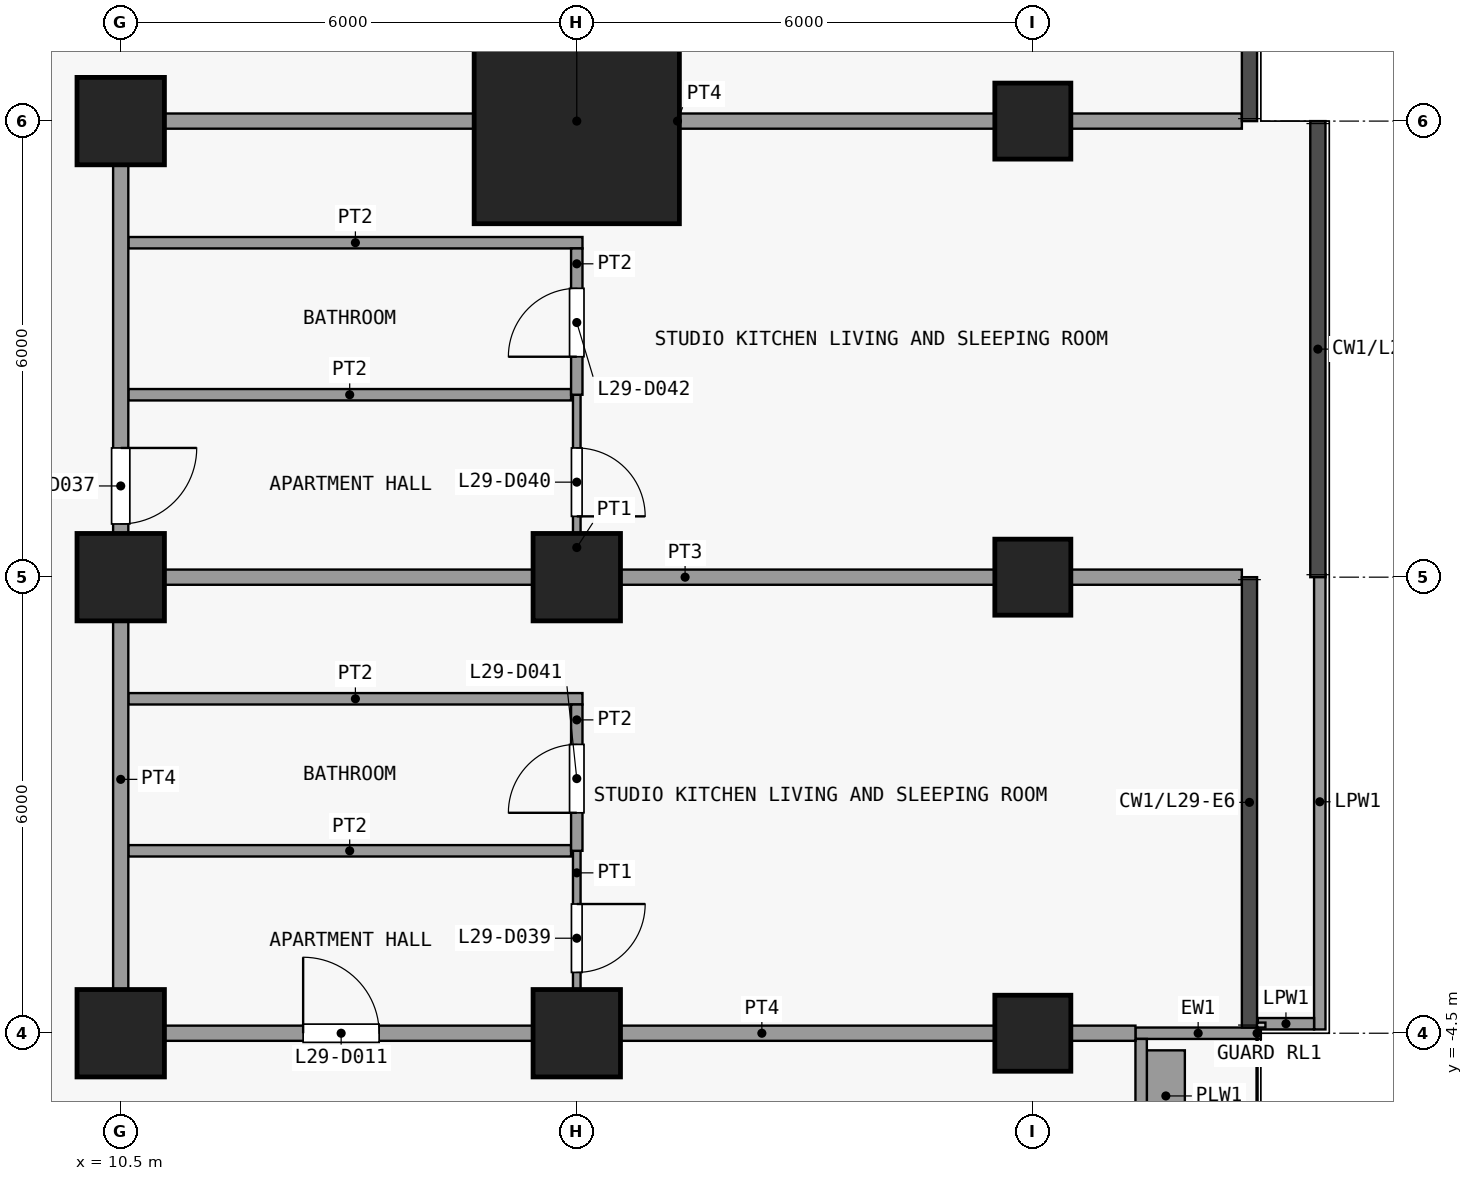
"""IFC4 building model, lengths in metres.
Left out: names, types, materials, properties, quantities, classifications, styles, units other than length and angle.
Written with IfcOpenShell. Run it as: python <this file> out.ifc"""

import sys

from ifc_helpers import new_model, si_unit, direction, frame, frame_2d, origin, origin_2d, place, context, subcontext, project, spatial, rectangle, extrude, element, fill, save


model = new_model("IFC4")
c1 = context("Model", 3, precision=1e-05, world=origin(), true_north=direction((0.0, 1.0)))
c2 = subcontext(c1, "Body", "Model", "MODEL_VIEW")
j1 = project(units=[si_unit("LENGTHUNIT", "METRE"), si_unit("PLANEANGLEUNIT", "RADIAN")], contexts=[c1])
p1 = place(None, origin())
s1 = spatial("IfcSite", under=j1, at=p1, CompositionType="ELEMENT")
p2 = place(p1, origin())
s2 = spatial("IfcBuilding", under=s1, at=p2, CompositionType="ELEMENT")
p3 = place(p2, frame((0.0, 0.0, 117.1)))
s3 = spatial("IfcBuildingStorey", under=s2, at=p3, CompositionType="ELEMENT", Elevation=117.1)
for number, where, z_axis, x_axis in (
    (1, (10.5, -4.5, 0.0), (0.0, 0.0, 1.0), (1.0, 0.0, 0.0)),
    (2, (10.5, 1.5, 0.0), (0.0, 0.0, 1.0), (1.0, 0.0, 0.0)),
    (3, (10.5, 7.5, 0.0), (0.0, 0.0, 1.0), (1.0, 0.0, 0.0)),
    (4, (16.5, -4.5, 0.0), (0.0, 0.0, 1.0), (1.0, 0.0, 0.0)),
    (5, (16.5, 1.5, 0.0), (0.0, 0.0, 1.0), (1.0, 0.0, 0.0)),
):
    element("IfcColumn", number, at=place(p3, frame(where, z_axis=z_axis, x_axis=x_axis)), inside=s3, PredefinedType="COLUMN", context=c2, shape_type="SweptSolid", body=[
        extrude(rectangle(XDim=1.15, YDim=1.15, at=origin_2d()), origin(), (0.0, 0.0, 1.0), 3.6),
    ])
p4 = place(p3, frame((16.5, 7.5, 0.0), z_axis=(0.0, 0.0, 1.0), x_axis=(1.0, 0.0, 0.0)))
e6 = element("IfcColumn", 6, at=p4, inside=s3, PredefinedType="COLUMN", context=c2, shape_type="SweptSolid", body=[
    extrude(rectangle(XDim=2.7, YDim=2.7, at=origin_2d()), origin(), (0.0, 0.0, 1.0), 3.6),
])
for number, where, z_axis, x_axis in (
    (7, (22.5, -4.5, 0.0), (0.0, 0.0, 1.0), (1.0, 0.0, 0.0)),
    (8, (22.5, 1.5, 0.0), (0.0, 0.0, 1.0), (1.0, 0.0, 0.0)),
    (9, (22.5, 7.5, 0.0), (0.0, 0.0, 1.0), (1.0, 0.0, 0.0)),
):
    element("IfcColumn", number, at=place(p3, frame(where, z_axis=z_axis, x_axis=x_axis)), inside=s3, PredefinedType="COLUMN", context=c2, shape_type="SweptSolid", body=[
        extrude(rectangle(XDim=1.0, YDim=1.0, at=origin_2d()), origin(), (0.0, 0.0, 1.0), 3.6),
    ])
p5 = place(p3, frame((23.85, -4.5, 0.0), z_axis=(0.0, 0.0, 1.0), x_axis=(1.0, 0.0, 0.0)))
e10 = element("IfcWall", 10, at=p5, inside=s3, PredefinedType="SOLIDWALL", context=c2, shape_type="SweptSolid", body=[
    extrude(rectangle(XDim=1.65, YDim=0.15, at=frame_2d((0.825, 0.0))), origin(), (0.0, 0.0, 1.0), 3.3),
])
p6 = place(p3, frame((23.925, -4.575, 0.0), z_axis=(0.0, 0.0, 1.0), x_axis=(0.0, -1.0, 0.0)))
e11 = element("IfcWall", 11, at=p6, inside=s3, PredefinedType="SOLIDWALL", context=c2, shape_type="SweptSolid", body=[
    extrude(rectangle(XDim=8.85, YDim=0.15, at=frame_2d((4.425, 0.0))), origin(), (0.0, 0.0, 1.0), 3.3),
])
p7 = place(p6, frame((5.525, 0.0, 0.0)))
e12 = element("IfcOpeningElement", 12, at=p7, cuts=e11, PredefinedType="OPENING", context=c2, shape_type="SweptSolid", body=[
    extrude(rectangle(XDim=1.2, YDim=2.4, at=frame_2d((0.6, 1.2))), frame((0.0, 0.085, 0.0), z_axis=(0.0, -1.0, 0.0), x_axis=(1.0, 0.0, 0.0)), (0.0, 0.0, 1.0), 0.17),
])
p8 = place(p6, frame((6.975, 0.0, 0.9)))
e13 = element("IfcOpeningElement", 13, at=p8, cuts=e11, PredefinedType="OPENING", context=c2, shape_type="SweptSolid", body=[
    extrude(rectangle(XDim=1.625, YDim=2.1, at=frame_2d((0.812, 1.05))), frame((0.0, 0.085, 0.0), z_axis=(0.0, -1.0, 0.0), x_axis=(1.0, 0.0, 0.0)), (0.0, 0.0, 1.0), 0.17),
])
p9 = place(p6, frame((1.263, 0.0, 0.9)))
e14 = element("IfcOpeningElement", 14, at=p9, cuts=e11, PredefinedType="OPENING", context=c2, shape_type="SweptSolid", body=[
    extrude(rectangle(XDim=1.812, YDim=2.1, at=frame_2d((0.906, 1.05))), frame((0.0, 0.085, 0.0), z_axis=(0.0, -1.0, 0.0), x_axis=(1.0, 0.0, 0.0)), (0.0, 0.0, 1.0), 0.17),
])
p10 = place(p3, frame((24.25, -5.925, 0.0), z_axis=(0.0, 0.0, 1.0), x_axis=(0.0, 1.0, 0.0)))
e15 = element("IfcWall", 15, at=p10, inside=s3, PredefinedType="USERDEFINED", context=c2, shape_type="SweptSolid", body=[
    extrude(rectangle(XDim=1.2, YDim=0.5, at=frame_2d((0.6, 0.0))), origin(), (0.0, 0.0, 1.0), 0.9),
])
p11 = place(p3, frame((26.275, 1.54, 0.0), z_axis=(0.0, 0.0, 1.0), x_axis=(0.0, -1.0, 0.0)))
e16 = element("IfcWall", 16, at=p11, inside=s3, PredefinedType="PARAPET", context=c2, shape_type="SweptSolid", body=[
    extrude(rectangle(XDim=5.99, YDim=0.15, at=frame_2d((2.995, 0.0))), origin(), (0.0, 0.0, 1.0), 1.15),
])
p12 = place(p3, frame((26.2, -4.375, 0.0), z_axis=(0.0, 0.0, 1.0), x_axis=(-1.0, 0.0, 0.0)))
e17 = element("IfcWall", 17, at=p12, inside=s3, PredefinedType="PARAPET", context=c2, shape_type="SweptSolid", body=[
    extrude(rectangle(XDim=0.74, YDim=0.15, at=frame_2d((0.37, 0.0))), origin(), (0.0, 0.0, 1.0), 1.15),
])
p13 = place(p3, frame((10.4, -4.5, 0.0), z_axis=(0.0, 0.0, 1.0), x_axis=(1.0, 0.0, 0.0)))
e18 = element("IfcWall", 18, at=p13, inside=s3, PredefinedType="PARTITIONING", context=c2, shape_type="SweptSolid", body=[
    extrude(rectangle(XDim=13.45, YDim=0.2, at=frame_2d((6.725, 0.0))), origin(), (0.0, 0.0, 1.0), 3.3),
])
p14 = place(p13, frame((2.5, 0.0, 0.0)))
e19 = element("IfcOpeningElement", 19, at=p14, cuts=e18, PredefinedType="OPENING", context=c2, shape_type="SweptSolid", body=[
    extrude(rectangle(XDim=1.0, YDim=2.1, at=frame_2d((0.5, 1.05))), frame((0.0, 0.11, 0.0), z_axis=(0.0, -1.0, 0.0), x_axis=(1.0, 0.0, 0.0)), (0.0, 0.0, 1.0), 0.22),
])
p15 = place(p3, frame((10.6, -2.1, 0.0), z_axis=(0.0, 0.0, 1.0), x_axis=(1.0, 0.0, 0.0)))
e20 = element("IfcWall", 20, at=p15, inside=s3, PredefinedType="PARTITIONING", context=c2, shape_type="SweptSolid", body=[
    extrude(rectangle(XDim=5.825, YDim=0.15, at=frame_2d((2.913, 0.0))), origin(), (0.0, 0.0, 1.0), 3.3),
])
p16 = place(p3, frame((10.6, -0.1, 0.0), z_axis=(0.0, 0.0, 1.0), x_axis=(1.0, 0.0, 0.0)))
e21 = element("IfcWall", 21, at=p16, inside=s3, PredefinedType="PARTITIONING", context=c2, shape_type="SweptSolid", body=[
    extrude(rectangle(XDim=5.975, YDim=0.15, at=frame_2d((2.987, 0.0))), origin(), (0.0, 0.0, 1.0), 3.3),
])
p17 = place(p3, frame((10.6, 1.5, 0.0), z_axis=(0.0, 0.0, 1.0), x_axis=(1.0, 0.0, 0.0)))
e22 = element("IfcWall", 22, at=p17, inside=s3, PredefinedType="PARTITIONING", context=c2, shape_type="SweptSolid", body=[
    extrude(rectangle(XDim=14.65, YDim=0.2, at=frame_2d((7.325, 0.0))), origin(), (0.0, 0.0, 1.0), 3.3),
])
p18 = place(p3, frame((10.6, 3.9, 0.0), z_axis=(0.0, 0.0, 1.0), x_axis=(1.0, 0.0, 0.0)))
e23 = element("IfcWall", 23, at=p18, inside=s3, PredefinedType="PARTITIONING", context=c2, shape_type="SweptSolid", body=[
    extrude(rectangle(XDim=5.825, YDim=0.15, at=frame_2d((2.913, 0.0))), origin(), (0.0, 0.0, 1.0), 3.3),
])
p19 = place(p3, frame((10.6, 5.9, 0.0), z_axis=(0.0, 0.0, 1.0), x_axis=(1.0, 0.0, 0.0)))
e24 = element("IfcWall", 24, at=p19, inside=s3, PredefinedType="PARTITIONING", context=c2, shape_type="SweptSolid", body=[
    extrude(rectangle(XDim=5.975, YDim=0.15, at=frame_2d((2.987, 0.0))), origin(), (0.0, 0.0, 1.0), 3.3),
])
p20 = place(p3, frame((10.4, 7.5, 0.0), z_axis=(0.0, 0.0, 1.0), x_axis=(1.0, 0.0, 0.0)))
e25 = element("IfcWall", 25, at=p20, inside=s3, PredefinedType="PARTITIONING", context=c2, shape_type="SweptSolid", body=[
    extrude(rectangle(XDim=14.85, YDim=0.2, at=frame_2d((7.425, 0.0))), origin(), (0.0, 0.0, 1.0), 3.3),
])
p21 = place(p3, frame((10.5, -4.4, 0.0), z_axis=(0.0, 0.0, 1.0), x_axis=(0.0, 1.0, 0.0)))
e26 = element("IfcWall", 26, at=p21, inside=s3, PredefinedType="PARTITIONING", context=c2, shape_type="SweptSolid", body=[
    extrude(rectangle(XDim=11.8, YDim=0.2, at=frame_2d((5.9, 0.0))), origin(), (0.0, 0.0, 1.0), 3.3),
])
p22 = place(p21, frame((6.6, 0.0, 0.0)))
e27 = element("IfcOpeningElement", 27, at=p22, cuts=e26, PredefinedType="OPENING", context=c2, shape_type="SweptSolid", body=[
    extrude(rectangle(XDim=1.0, YDim=2.1, at=frame_2d((0.5, 1.05))), frame((0.0, 0.11, 0.0), z_axis=(0.0, -1.0, 0.0), x_axis=(1.0, 0.0, 0.0)), (0.0, 0.0, 1.0), 0.22),
])
p23 = place(p3, frame((16.5, -4.4, 0.0), z_axis=(0.0, 0.0, 1.0), x_axis=(0.0, 1.0, 0.0)))
e28 = element("IfcWall", 28, at=p23, inside=s3, PredefinedType="PARTITIONING", context=c2, shape_type="SweptSolid", body=[
    extrude(rectangle(XDim=2.3, YDim=0.1, at=frame_2d((1.15, 0.0))), origin(), (0.0, 0.0, 1.0), 3.3),
])
p24 = place(p23, frame((0.7, 0.0, 0.0)))
e29 = element("IfcOpeningElement", 29, at=p24, cuts=e28, PredefinedType="OPENING", context=c2, shape_type="SweptSolid", body=[
    extrude(rectangle(XDim=0.9, YDim=2.1, at=frame_2d((0.45, 1.05))), frame((0.0, 0.06, 0.0), z_axis=(0.0, -1.0, 0.0), x_axis=(1.0, 0.0, 0.0)), (0.0, 0.0, 1.0), 0.12),
])
p25 = place(p3, frame((16.5, 1.6, 0.0), z_axis=(0.0, 0.0, 1.0), x_axis=(0.0, 1.0, 0.0)))
e30 = element("IfcWall", 30, at=p25, inside=s3, PredefinedType="PARTITIONING", context=c2, shape_type="SweptSolid", body=[
    extrude(rectangle(XDim=2.3, YDim=0.1, at=frame_2d((1.15, 0.0))), origin(), (0.0, 0.0, 1.0), 3.3),
])
p26 = place(p25, frame((0.7, 0.0, 0.0)))
e31 = element("IfcOpeningElement", 31, at=p26, cuts=e30, PredefinedType="OPENING", context=c2, shape_type="SweptSolid", body=[
    extrude(rectangle(XDim=0.9, YDim=2.1, at=frame_2d((0.45, 1.05))), frame((0.0, 0.06, 0.0), z_axis=(0.0, -1.0, 0.0), x_axis=(1.0, 0.0, 0.0)), (0.0, 0.0, 1.0), 0.12),
])
p27 = place(p3, frame((16.5, -2.1, 0.0), z_axis=(0.0, 0.0, 1.0), x_axis=(0.0, 1.0, 0.0)))
e32 = element("IfcWall", 32, at=p27, inside=s3, PredefinedType="PARTITIONING", context=c2, shape_type="SweptSolid", body=[
    extrude(rectangle(XDim=1.925, YDim=0.15, at=frame_2d((0.962, 0.0))), origin(), (0.0, 0.0, 1.0), 3.3),
])
p28 = place(p27, frame((0.5, 0.0, 0.0)))
e33 = element("IfcOpeningElement", 33, at=p28, cuts=e32, PredefinedType="OPENING", context=c2, shape_type="SweptSolid", body=[
    extrude(rectangle(XDim=0.9, YDim=2.1, at=frame_2d((0.45, 1.05))), frame((0.0, 0.085, 0.0), z_axis=(0.0, -1.0, 0.0), x_axis=(1.0, 0.0, 0.0)), (0.0, 0.0, 1.0), 0.17),
])
p29 = place(p3, frame((16.5, 3.9, 0.0), z_axis=(0.0, 0.0, 1.0), x_axis=(0.0, 1.0, 0.0)))
e34 = element("IfcWall", 34, at=p29, inside=s3, PredefinedType="PARTITIONING", context=c2, shape_type="SweptSolid", body=[
    extrude(rectangle(XDim=1.925, YDim=0.15, at=frame_2d((0.962, 0.0))), origin(), (0.0, 0.0, 1.0), 3.3),
])
p30 = place(p29, frame((0.5, 0.0, 0.0)))
e35 = element("IfcOpeningElement", 35, at=p30, cuts=e34, PredefinedType="OPENING", context=c2, shape_type="SweptSolid", body=[
    extrude(rectangle(XDim=0.9, YDim=2.1, at=frame_2d((0.45, 1.05))), frame((0.0, 0.085, 0.0), z_axis=(0.0, -1.0, 0.0), x_axis=(1.0, 0.0, 0.0)), (0.0, 0.0, 1.0), 0.17),
])
p31 = place(p14, origin())
e36 = element("IfcDoor", 36, at=p31, inside=s3, OperationType="SINGLE_SWING_RIGHT", PredefinedType="DOOR", context=c2, shape_type="SweptSolid", body=[
    extrude(rectangle(XDim=1.0, YDim=2.1, at=frame_2d((0.5, 1.05))), frame((0.0, 0.025, 0.0), z_axis=(0.0, -1.0, 0.0), x_axis=(1.0, 0.0, 0.0)), (0.0, 0.0, 1.0), 0.05),
])
fill(e19, e36)
p32 = place(p22, origin())
e37 = element("IfcDoor", 37, at=p32, inside=s3, OperationType="SINGLE_SWING_RIGHT", PredefinedType="DOOR", context=c2, shape_type="SweptSolid", body=[
    extrude(rectangle(XDim=1.0, YDim=2.1, at=frame_2d((0.5, 1.05))), frame((0.0, 0.025, 0.0), z_axis=(0.0, -1.0, 0.0), x_axis=(1.0, 0.0, 0.0)), (0.0, 0.0, 1.0), 0.05),
])
fill(e27, e37)
p33 = place(p24, origin())
e38 = element("IfcDoor", 38, at=p33, inside=s3, OperationType="SINGLE_SWING_RIGHT", PredefinedType="DOOR", context=c2, shape_type="SweptSolid", body=[
    extrude(rectangle(XDim=0.9, YDim=2.1, at=frame_2d((0.45, 1.05))), frame((0.0, 0.025, 0.0), z_axis=(0.0, -1.0, 0.0), x_axis=(1.0, 0.0, 0.0)), (0.0, 0.0, 1.0), 0.05),
])
fill(e29, e38)
p34 = place(p26, origin())
e39 = element("IfcDoor", 39, at=p34, inside=s3, OperationType="SINGLE_SWING_LEFT", PredefinedType="DOOR", context=c2, shape_type="SweptSolid", body=[
    extrude(rectangle(XDim=0.9, YDim=2.1, at=frame_2d((0.45, 1.05))), frame((0.0, 0.025, 0.0), z_axis=(0.0, -1.0, 0.0), x_axis=(1.0, 0.0, 0.0)), (0.0, 0.0, 1.0), 0.05),
])
fill(e31, e39)
p35 = place(p28, origin())
e40 = element("IfcDoor", 40, at=p35, inside=s3, OperationType="SINGLE_SWING_RIGHT", PredefinedType="DOOR", context=c2, shape_type="SweptSolid", body=[
    extrude(rectangle(XDim=0.9, YDim=2.1, at=frame_2d((0.45, 1.05))), frame((0.0, 0.025, 0.0), z_axis=(0.0, -1.0, 0.0), x_axis=(1.0, 0.0, 0.0)), (0.0, 0.0, 1.0), 0.05),
])
fill(e33, e40)
p36 = place(p30, origin())
e41 = element("IfcDoor", 41, at=p36, inside=s3, OperationType="SINGLE_SWING_RIGHT", PredefinedType="DOOR", context=c2, shape_type="SweptSolid", body=[
    extrude(rectangle(XDim=0.9, YDim=2.1, at=frame_2d((0.45, 1.05))), frame((0.0, 0.025, 0.0), z_axis=(0.0, -1.0, 0.0), x_axis=(1.0, 0.0, 0.0)), (0.0, 0.0, 1.0), 0.05),
])
fill(e35, e41)
save(model, sys.argv[1])
